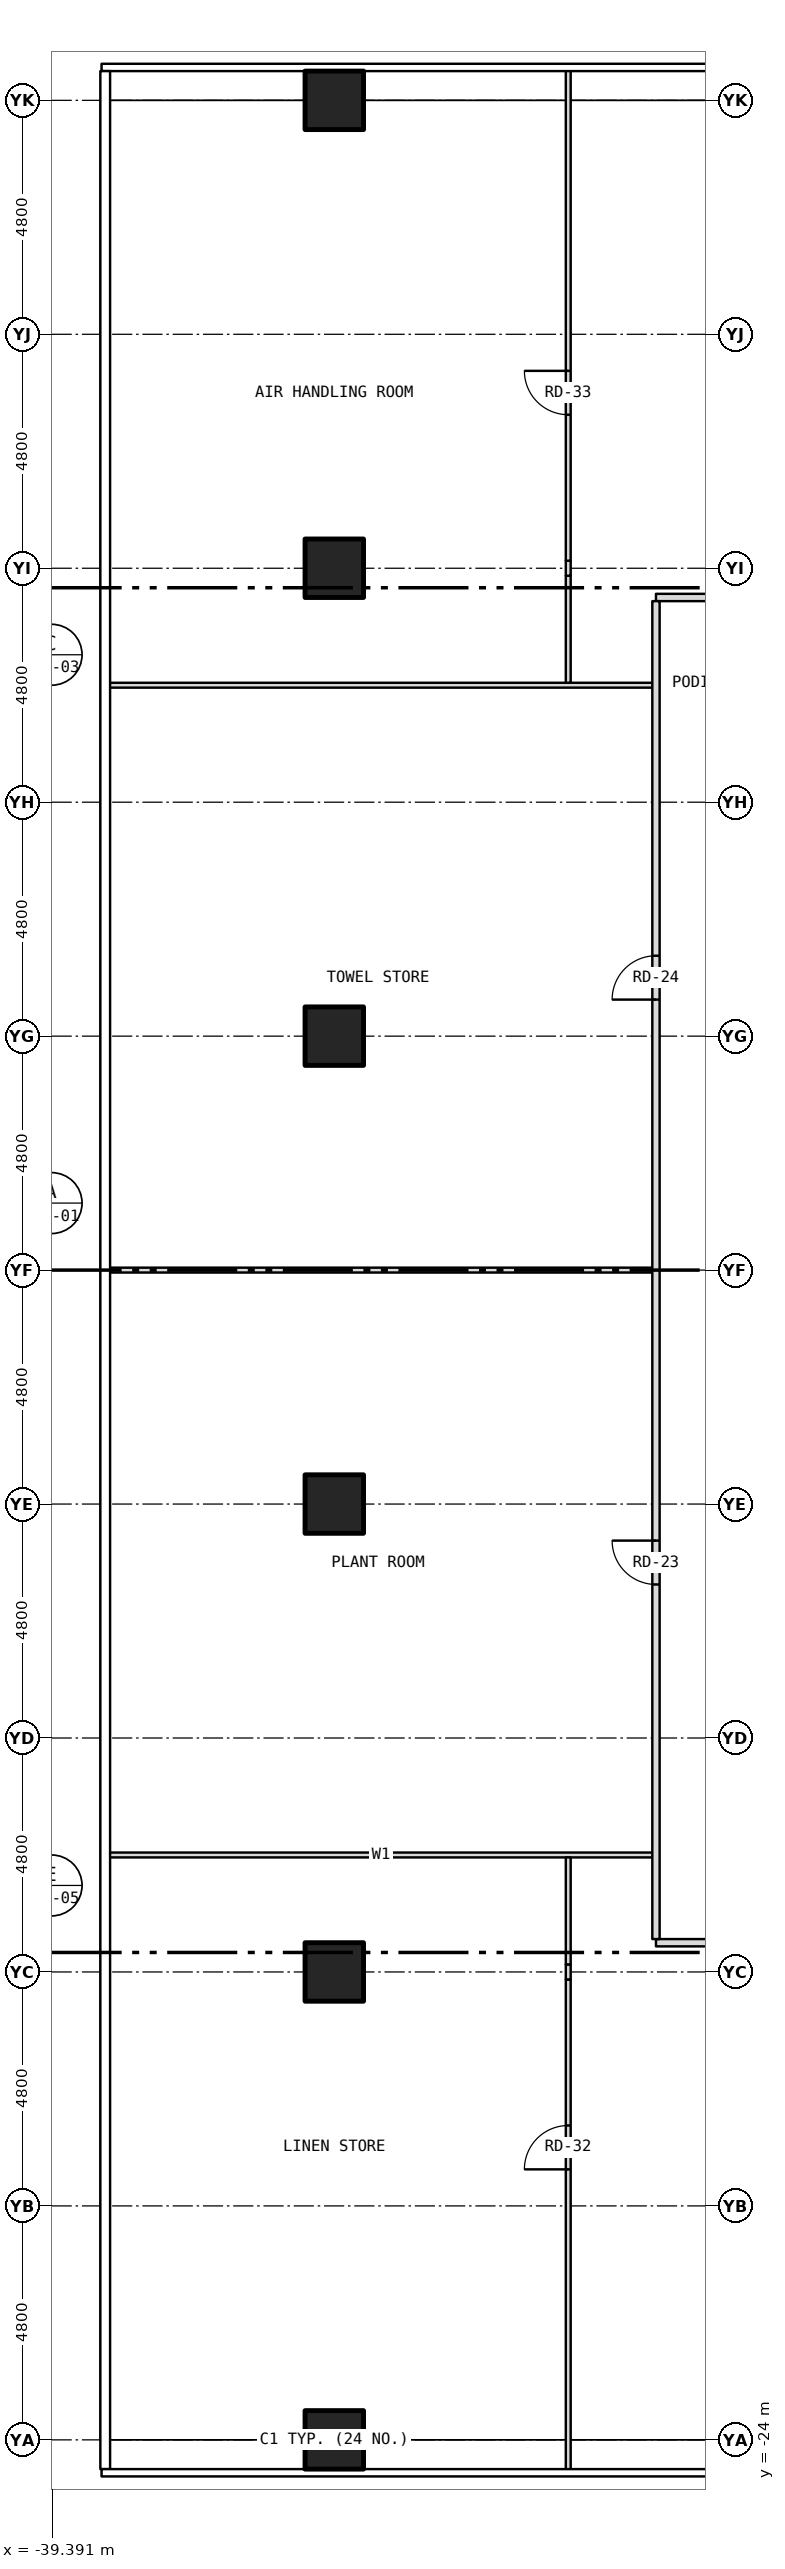
"""IFC4 building model, lengths in metres.
Left out: names, types, materials, properties, quantities, classifications, styles, units other than length and angle.
Written with IfcOpenShell. Run it as: python <this file> out.ifc"""

import sys

from ifc_helpers import new_model, si_unit, direction, frame, frame_2d, origin, origin_2d, place, context, subcontext, project, spatial, rectangle, hollow_rectangle, extrude, element, fill, save


model = new_model("IFC4")
c1 = context("Model", 3, precision=1e-05, world=origin(), true_north=direction((0.0, 1.0)))
c2 = subcontext(c1, "Body", "Model", "MODEL_VIEW")
j1 = project(units=[si_unit("LENGTHUNIT", "METRE"), si_unit("PLANEANGLEUNIT", "RADIAN")], contexts=[c1])
p1 = place(None, origin())
s1 = spatial("IfcSite", under=j1, at=p1, CompositionType="ELEMENT")
p2 = place(p1, origin())
s2 = spatial("IfcBuilding", under=s1, at=p2, CompositionType="ELEMENT")
p3 = place(p2, frame((0.0, 0.0, 20.0)))
s3 = spatial("IfcBuildingStorey", under=s2, at=p3, CompositionType="ELEMENT", Elevation=20.0)
for number, where, z_axis, x_axis in (
    (1, (-33.6, -24.0, -0.2), (0.0, 0.0, 1.0), (1.0, 0.0, 0.0)),
    (2, (-33.6, -14.4, -0.2), (0.0, 0.0, 1.0), (1.0, 0.0, 0.0)),
    (3, (-33.6, -4.8, -0.2), (0.0, 0.0, 1.0), (1.0, 0.0, 0.0)),
    (4, (-33.6, 4.8, -0.2), (0.0, 0.0, 1.0), (1.0, 0.0, 0.0)),
    (5, (-33.6, 14.4, -0.2), (0.0, 0.0, 1.0), (1.0, 0.0, 0.0)),
    (6, (-33.6, 24.0, -0.2), (0.0, 0.0, 1.0), (1.0, 0.0, 0.0)),
):
    element("IfcColumn", number, at=place(p3, frame(where, z_axis=z_axis, x_axis=x_axis)), inside=s3, PredefinedType="COLUMN", context=c2, shape_type="SweptSolid", body=[
        extrude(hollow_rectangle(XDim=1.2, YDim=1.2, WallThickness=0.07, at=origin_2d()), origin(), (0.0, 0.0, 1.0), 4.5),
    ])
p4 = place(p3, frame((-27.0, -13.8, 0.0), z_axis=(0.0, 0.0, 1.0), x_axis=(1.0, 0.0, 0.0)))
e7 = element("IfcWall", 7, at=p4, inside=s3, PredefinedType="PARTITIONING", context=c2, shape_type="SweptSolid", body=[
    extrude(rectangle(XDim=54.0, YDim=0.15, at=frame_2d((27.0, 0.0))), origin(), (0.0, 0.0, 1.0), 4.3),
])
p5 = place(p4, frame((9.03, 0.0, 0.0)))
e8 = element("IfcOpeningElement", 8, at=p5, cuts=e7, PredefinedType="OPENING", context=c2, shape_type="SweptSolid", body=[
    extrude(rectangle(XDim=0.9, YDim=2.1, at=frame_2d((0.45, 1.05))), frame((0.0, 0.087, 0.0), z_axis=(0.0, -1.0, 0.0), x_axis=(1.0, 0.0, 0.0)), (0.0, 0.0, 1.0), 0.174),
])
p6 = place(p4, frame((11.08, 0.0, 0.0)))
e9 = element("IfcOpeningElement", 9, at=p6, cuts=e7, PredefinedType="OPENING", context=c2, shape_type="SweptSolid", body=[
    extrude(rectangle(XDim=0.9, YDim=2.1, at=frame_2d((0.45, 1.05))), frame((0.0, 0.087, 0.0), z_axis=(0.0, -1.0, 0.0), x_axis=(1.0, 0.0, 0.0)), (0.0, 0.0, 1.0), 0.174),
])
p7 = place(p4, frame((14.138, 0.0, 0.0)))
e10 = element("IfcOpeningElement", 10, at=p7, cuts=e7, PredefinedType="OPENING", context=c2, shape_type="SweptSolid", body=[
    extrude(rectangle(XDim=0.9, YDim=2.1, at=frame_2d((0.45, 1.05))), frame((0.0, 0.087, 0.0), z_axis=(0.0, -1.0, 0.0), x_axis=(1.0, 0.0, 0.0)), (0.0, 0.0, 1.0), 0.174),
])
p8 = place(p4, frame((22.95, 0.0, 0.0)))
e11 = element("IfcOpeningElement", 11, at=p8, cuts=e7, PredefinedType="OPENING", context=c2, shape_type="SweptSolid", body=[
    extrude(rectangle(XDim=0.9, YDim=2.1, at=frame_2d((0.45, 1.05))), frame((0.0, 0.087, 0.0), z_axis=(0.0, -1.0, 0.0), x_axis=(1.0, 0.0, 0.0)), (0.0, 0.0, 1.0), 0.174),
])
p9 = place(p4, frame((29.891, 0.0, 0.0)))
e12 = element("IfcOpeningElement", 12, at=p9, cuts=e7, PredefinedType="OPENING", context=c2, shape_type="SweptSolid", body=[
    extrude(rectangle(XDim=0.9, YDim=2.1, at=frame_2d((0.45, 1.05))), frame((0.0, 0.087, 0.0), z_axis=(0.0, -1.0, 0.0), x_axis=(1.0, 0.0, 0.0)), (0.0, 0.0, 1.0), 0.174),
])
p10 = place(p4, frame((3.75, 0.0, 0.0)))
e13 = element("IfcOpeningElement", 13, at=p10, cuts=e7, PredefinedType="OPENING", context=c2, shape_type="SweptSolid", body=[
    extrude(rectangle(XDim=0.9, YDim=2.1, at=frame_2d((0.45, 1.05))), frame((0.0, 0.087, 0.0), z_axis=(0.0, -1.0, 0.0), x_axis=(1.0, 0.0, 0.0)), (0.0, 0.0, 1.0), 0.174),
])
p11 = place(p4, frame((49.35, 0.0, 0.0)))
e14 = element("IfcOpeningElement", 14, at=p11, cuts=e7, PredefinedType="OPENING", context=c2, shape_type="SweptSolid", body=[
    extrude(rectangle(XDim=0.9, YDim=2.1, at=frame_2d((0.45, 1.05))), frame((0.0, 0.087, 0.0), z_axis=(0.0, -1.0, 0.0), x_axis=(1.0, 0.0, 0.0)), (0.0, 0.0, 1.0), 0.174),
])
p12 = place(p4, frame((42.15, 0.0, 0.0)))
e15 = element("IfcOpeningElement", 15, at=p12, cuts=e7, PredefinedType="OPENING", context=c2, shape_type="SweptSolid", body=[
    extrude(rectangle(XDim=0.9, YDim=2.1, at=frame_2d((0.45, 1.05))), frame((0.0, 0.087, 0.0), z_axis=(0.0, -1.0, 0.0), x_axis=(1.0, 0.0, 0.0)), (0.0, 0.0, 1.0), 0.174),
])
p13 = place(p4, frame((16.137, 0.0, 0.0)))
e16 = element("IfcOpeningElement", 16, at=p13, cuts=e7, PredefinedType="OPENING", context=c2, shape_type="SweptSolid", body=[
    extrude(rectangle(XDim=0.9, YDim=2.1, at=frame_2d((0.45, 1.05))), frame((0.0, 0.087, 0.0), z_axis=(0.0, -1.0, 0.0), x_axis=(1.0, 0.0, 0.0)), (0.0, 0.0, 1.0), 0.174),
])
for number, where, z_axis, x_axis in (
    (17, (-38.28, -12.0, 0.0), (0.0, 0.0, 1.0), (1.0, 0.0, 0.0)),
    (18, (-38.28, 0.0, 0.0), (0.0, 0.0, 1.0), (1.0, 0.0, 0.0)),
    (19, (-38.28, 12.0, 0.0), (0.0, 0.0, 1.0), (1.0, 0.0, 0.0)),
):
    element("IfcWall", number, at=place(p3, frame(where, z_axis=z_axis, x_axis=x_axis)), inside=s3, PredefinedType="PARTITIONING", context=c2, shape_type="SweptSolid", body=[
        extrude(rectangle(XDim=11.28, YDim=0.1, at=frame_2d((5.64, 0.0))), origin(), (0.0, 0.0, 1.0), 4.3),
    ])
p14 = place(p3, frame((-27.0, 13.8, 0.0), z_axis=(0.0, 0.0, 1.0), x_axis=(1.0, 0.0, 0.0)))
e20 = element("IfcWall", 20, at=p14, inside=s3, PredefinedType="PARTITIONING", context=c2, shape_type="SweptSolid", body=[
    extrude(rectangle(XDim=54.0, YDim=0.15, at=frame_2d((27.0, 0.0))), origin(), (0.0, 0.0, 1.0), 4.3),
])
p15 = place(p14, frame((8.576, 0.0, 0.0)))
e21 = element("IfcOpeningElement", 21, at=p15, cuts=e20, PredefinedType="OPENING", context=c2, shape_type="SweptSolid", body=[
    extrude(rectangle(XDim=0.9, YDim=2.1, at=frame_2d((0.45, 1.05))), frame((0.0, 0.087, 0.0), z_axis=(0.0, -1.0, 0.0), x_axis=(1.0, 0.0, 0.0)), (0.0, 0.0, 1.0), 0.174),
])
p16 = place(p14, frame((11.027, 0.0, 0.0)))
e22 = element("IfcOpeningElement", 22, at=p16, cuts=e20, PredefinedType="OPENING", context=c2, shape_type="SweptSolid", body=[
    extrude(rectangle(XDim=0.9, YDim=2.1, at=frame_2d((0.45, 1.05))), frame((0.0, 0.087, 0.0), z_axis=(0.0, -1.0, 0.0), x_axis=(1.0, 0.0, 0.0)), (0.0, 0.0, 1.0), 0.174),
])
p17 = place(p14, frame((13.478, 0.0, 0.0)))
e23 = element("IfcOpeningElement", 23, at=p17, cuts=e20, PredefinedType="OPENING", context=c2, shape_type="SweptSolid", body=[
    extrude(rectangle(XDim=0.9, YDim=2.1, at=frame_2d((0.45, 1.05))), frame((0.0, 0.087, 0.0), z_axis=(0.0, -1.0, 0.0), x_axis=(1.0, 0.0, 0.0)), (0.0, 0.0, 1.0), 0.174),
])
p18 = place(p14, frame((19.748, 0.0, 0.0)))
e24 = element("IfcOpeningElement", 24, at=p18, cuts=e20, PredefinedType="OPENING", context=c2, shape_type="SweptSolid", body=[
    extrude(rectangle(XDim=0.9, YDim=2.1, at=frame_2d((0.45, 1.05))), frame((0.0, 0.087, 0.0), z_axis=(0.0, -1.0, 0.0), x_axis=(1.0, 0.0, 0.0)), (0.0, 0.0, 1.0), 0.174),
])
p19 = place(p14, frame((29.491, 0.0, 0.0)))
e25 = element("IfcOpeningElement", 25, at=p19, cuts=e20, PredefinedType="OPENING", context=c2, shape_type="SweptSolid", body=[
    extrude(rectangle(XDim=0.9, YDim=2.1, at=frame_2d((0.45, 1.05))), frame((0.0, 0.087, 0.0), z_axis=(0.0, -1.0, 0.0), x_axis=(1.0, 0.0, 0.0)), (0.0, 0.0, 1.0), 0.174),
])
p20 = place(p14, frame((34.291, 0.0, 0.0)))
e26 = element("IfcOpeningElement", 26, at=p20, cuts=e20, PredefinedType="OPENING", context=c2, shape_type="SweptSolid", body=[
    extrude(rectangle(XDim=0.9, YDim=2.1, at=frame_2d((0.45, 1.05))), frame((0.0, 0.087, 0.0), z_axis=(0.0, -1.0, 0.0), x_axis=(1.0, 0.0, 0.0)), (0.0, 0.0, 1.0), 0.174),
])
p21 = place(p14, frame((42.032, 0.0, 0.0)))
e27 = element("IfcOpeningElement", 27, at=p21, cuts=e20, PredefinedType="OPENING", context=c2, shape_type="SweptSolid", body=[
    extrude(rectangle(XDim=0.9, YDim=2.1, at=frame_2d((0.45, 1.05))), frame((0.0, 0.087, 0.0), z_axis=(0.0, -1.0, 0.0), x_axis=(1.0, 0.0, 0.0)), (0.0, 0.0, 1.0), 0.174),
])
p22 = place(p14, frame((24.548, 0.0, 0.0)))
e28 = element("IfcOpeningElement", 28, at=p22, cuts=e20, PredefinedType="OPENING", context=c2, shape_type="SweptSolid", body=[
    extrude(rectangle(XDim=0.9, YDim=2.1, at=frame_2d((0.45, 1.05))), frame((0.0, 0.087, 0.0), z_axis=(0.0, -1.0, 0.0), x_axis=(1.0, 0.0, 0.0)), (0.0, 0.0, 1.0), 0.174),
])
p23 = place(p14, frame((3.75, 0.0, 0.0)))
e29 = element("IfcOpeningElement", 29, at=p23, cuts=e20, PredefinedType="OPENING", context=c2, shape_type="SweptSolid", body=[
    extrude(rectangle(XDim=0.9, YDim=2.1, at=frame_2d((0.45, 1.05))), frame((0.0, 0.087, 0.0), z_axis=(0.0, -1.0, 0.0), x_axis=(1.0, 0.0, 0.0)), (0.0, 0.0, 1.0), 0.174),
])
p24 = place(p14, frame((49.35, 0.0, 0.0)))
e30 = element("IfcOpeningElement", 30, at=p24, cuts=e20, PredefinedType="OPENING", context=c2, shape_type="SweptSolid", body=[
    extrude(rectangle(XDim=0.9, YDim=2.1, at=frame_2d((0.45, 1.05))), frame((0.0, 0.087, 0.0), z_axis=(0.0, -1.0, 0.0), x_axis=(1.0, 0.0, 0.0)), (0.0, 0.0, 1.0), 0.174),
])
p25 = place(p3, frame((-28.8, -24.63, 0.0), z_axis=(0.0, 0.0, 1.0), x_axis=(0.0, 1.0, 0.0)))
e31 = element("IfcWall", 31, at=p25, inside=s3, PredefinedType="PARTITIONING", context=c2, shape_type="SweptSolid", body=[
    extrude(rectangle(XDim=10.076, YDim=0.1, at=frame_2d((5.038, 0.0))), origin(), (0.0, 0.0, 1.0), 3.683),
])
p26 = place(p25, frame((6.18, 0.0, 0.0)))
e32 = element("IfcOpeningElement", 32, at=p26, cuts=e31, PredefinedType="OPENING", context=c2, shape_type="SweptSolid", body=[
    extrude(rectangle(XDim=0.9, YDim=2.1, at=frame_2d((0.45, 1.05))), frame((0.0, 0.062, 0.0), z_axis=(0.0, -1.0, 0.0), x_axis=(1.0, 0.0, 0.0)), (0.0, 0.0, 1.0), 0.124),
])
p27 = place(p3, frame((-28.8, -14.554, 0.0), z_axis=(0.0, 0.0, 1.0), x_axis=(0.0, 1.0, 0.0)))
e33 = element("IfcWall", 33, at=p27, inside=s3, PredefinedType="PARTITIONING", context=c2, shape_type="SweptSolid", body=[
    extrude(rectangle(XDim=0.308, YDim=0.1, at=frame_2d((0.154, 0.0))), origin(), (0.0, 0.0, 1.0), 4.3),
])
for number, where, z_axis, x_axis in (
    (34, (-28.8, -14.246, 0.0), (0.0, 0.0, 1.0), (0.0, 1.0, 0.0)),
    (35, (-28.8, 12.05, 0.0), (0.0, 0.0, 1.0), (0.0, 1.0, 0.0)),
):
    element("IfcWall", number, at=place(p3, frame(where, z_axis=z_axis, x_axis=x_axis)), inside=s3, PredefinedType="PARTITIONING", context=c2, shape_type="SweptSolid", body=[
        extrude(rectangle(XDim=2.196, YDim=0.1, at=frame_2d((1.098, 0.0))), origin(), (0.0, 0.0, 1.0), 3.683),
    ])
p28 = place(p3, frame((-28.8, 14.246, 0.0), z_axis=(0.0, 0.0, 1.0), x_axis=(0.0, 1.0, 0.0)))
e36 = element("IfcWall", 36, at=p28, inside=s3, PredefinedType="PARTITIONING", context=c2, shape_type="SweptSolid", body=[
    extrude(rectangle(XDim=0.308, YDim=0.1, at=frame_2d((0.154, 0.0))), origin(), (0.0, 0.0, 1.0), 4.3),
])
p29 = place(p3, frame((-28.8, 14.554, 0.0), z_axis=(0.0, 0.0, 1.0), x_axis=(0.0, 1.0, 0.0)))
e37 = element("IfcWall", 37, at=p29, inside=s3, PredefinedType="PARTITIONING", context=c2, shape_type="SweptSolid", body=[
    extrude(rectangle(XDim=10.076, YDim=0.1, at=frame_2d((5.038, 0.0))), origin(), (0.0, 0.0, 1.0), 3.683),
])
p30 = place(p29, frame((2.996, 0.0, 0.0)))
e38 = element("IfcOpeningElement", 38, at=p30, cuts=e37, PredefinedType="OPENING", context=c2, shape_type="SweptSolid", body=[
    extrude(rectangle(XDim=0.9, YDim=2.1, at=frame_2d((0.45, 1.05))), frame((0.0, 0.062, 0.0), z_axis=(0.0, -1.0, 0.0), x_axis=(1.0, 0.0, 0.0)), (0.0, 0.0, 1.0), 0.124),
])
p31 = place(p3, frame((-27.0, -13.725, 0.0), z_axis=(0.0, 0.0, 1.0), x_axis=(0.0, 1.0, 0.0)))
e39 = element("IfcWall", 39, at=p31, inside=s3, PredefinedType="PARTITIONING", context=c2, shape_type="SweptSolid", body=[
    extrude(rectangle(XDim=27.45, YDim=0.15, at=frame_2d((13.725, 0.0))), origin(), (0.0, 0.0, 1.0), 4.3),
])
p32 = place(p31, frame((7.275, 0.0, 0.0)))
e40 = element("IfcOpeningElement", 40, at=p32, cuts=e39, PredefinedType="OPENING", context=c2, shape_type="SweptSolid", body=[
    extrude(rectangle(XDim=0.9, YDim=2.1, at=frame_2d((0.45, 1.05))), frame((0.0, 0.087, 0.0), z_axis=(0.0, -1.0, 0.0), x_axis=(1.0, 0.0, 0.0)), (0.0, 0.0, 1.0), 0.174),
])
p33 = place(p31, frame((19.275, 0.0, 0.0)))
e41 = element("IfcOpeningElement", 41, at=p33, cuts=e39, PredefinedType="OPENING", context=c2, shape_type="SweptSolid", body=[
    extrude(rectangle(XDim=0.9, YDim=2.1, at=frame_2d((0.45, 1.05))), frame((0.0, 0.087, 0.0), z_axis=(0.0, -1.0, 0.0), x_axis=(1.0, 0.0, 0.0)), (0.0, 0.0, 1.0), 0.174),
])
p34 = place(p32, origin())
e42 = element("IfcDoor", 42, at=p34, inside=s3, OperationType="SINGLE_SWING_RIGHT", PredefinedType="DOOR", context=c2, shape_type="SweptSolid", body=[
    extrude(rectangle(XDim=0.9, YDim=2.1, at=frame_2d((0.45, 1.05))), frame((0.0, 0.025, 0.0), z_axis=(0.0, -1.0, 0.0), x_axis=(1.0, 0.0, 0.0)), (0.0, 0.0, 1.0), 0.05),
])
fill(e40, e42)
p35 = place(p33, origin())
e43 = element("IfcDoor", 43, at=p35, inside=s3, OperationType="SINGLE_SWING_LEFT", PredefinedType="DOOR", context=c2, shape_type="SweptSolid", body=[
    extrude(rectangle(XDim=0.9, YDim=2.1, at=frame_2d((0.45, 1.05))), frame((0.0, 0.025, 0.0), z_axis=(0.0, -1.0, 0.0), x_axis=(1.0, 0.0, 0.0)), (0.0, 0.0, 1.0), 0.05),
])
fill(e41, e43)
p36 = place(p26, origin())
e44 = element("IfcDoor", 44, at=p36, inside=s3, OperationType="SINGLE_SWING_LEFT", PredefinedType="DOOR", context=c2, shape_type="SweptSolid", body=[
    extrude(rectangle(XDim=0.9, YDim=2.1, at=frame_2d((0.45, 1.05))), frame((0.0, 0.025, 0.0), z_axis=(0.0, -1.0, 0.0), x_axis=(1.0, 0.0, 0.0)), (0.0, 0.0, 1.0), 0.05),
])
fill(e32, e44)
p37 = place(p30, origin())
e45 = element("IfcDoor", 45, at=p37, inside=s3, OperationType="SINGLE_SWING_RIGHT", PredefinedType="DOOR", context=c2, shape_type="SweptSolid", body=[
    extrude(rectangle(XDim=0.9, YDim=2.1, at=frame_2d((0.45, 1.05))), frame((0.0, 0.025, 0.0), z_axis=(0.0, -1.0, 0.0), x_axis=(1.0, 0.0, 0.0)), (0.0, 0.0, 1.0), 0.05),
])
fill(e38, e45)
save(model, sys.argv[1])
